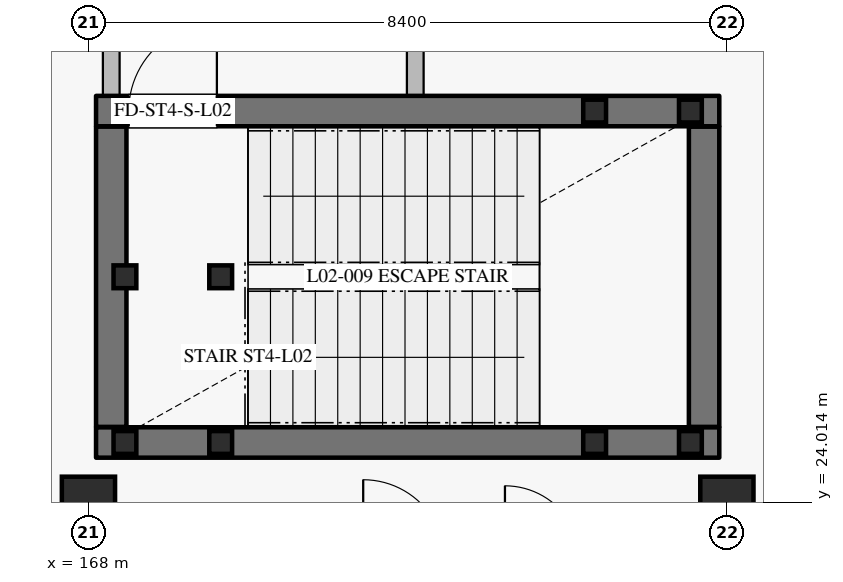
"""IFC4 building model, lengths in metres.
Left out: names, types, materials, properties, quantities, classifications, styles, units other than length and angle.
Written with IfcOpenShell. Run it as: python <this file> out.ifc"""

import sys

from ifc_helpers import new_model, si_unit, direction, frame, frame_2d, origin, origin_2d, place, context, subcontext, project, spatial, rectangle, hollow_rectangle, extrude, element, fill, save


model = new_model("IFC4")
c1 = context("Model", 3, precision=1e-05, world=origin(), true_north=direction((0.0, 1.0)))
c2 = subcontext(c1, "Body", "Model", "MODEL_VIEW")
j1 = project(units=[si_unit("LENGTHUNIT", "METRE"), si_unit("PLANEANGLEUNIT", "RADIAN")], contexts=[c1])
p1 = place(None, origin())
s1 = spatial("IfcSite", under=j1, at=p1, CompositionType="ELEMENT")
p2 = place(p1, origin())
s2 = spatial("IfcBuilding", under=s1, at=p2, CompositionType="ELEMENT")
p3 = place(p2, frame((0.0, 0.0, 11.4)))
s3 = spatial("IfcBuildingStorey", under=s2, at=p3, CompositionType="ELEMENT", Elevation=11.4)
for number, where, z_axis, x_axis in (
    (1, (168.0, 24.0, 0.0), (0.0, 0.0, 1.0), (1.0, 0.0, 0.0)),
    (2, (176.4, 24.0, 0.0), (0.0, 0.0, 1.0), (1.0, 0.0, 0.0)),
):
    element("IfcColumn", number, at=place(p3, frame(where, z_axis=z_axis, x_axis=x_axis)), inside=s3, PredefinedType="COLUMN", context=c2, shape_type="SweptSolid", body=[
        extrude(rectangle(XDim=0.7, YDim=0.7, at=origin_2d()), origin(), (0.0, 0.0, 1.0), 4.8),
    ])
p4 = place(p3, frame((168.1, 24.8, 0.0), z_axis=(0.0, 0.0, 1.0), x_axis=(1.0, 0.0, 0.0)))
e3 = element("IfcWall", 3, at=p4, inside=s3, PredefinedType="SHEAR", context=c2, shape_type="SweptSolid", body=[
    extrude(rectangle(XDim=8.2, YDim=0.4, at=frame_2d((4.1, 0.0))), origin(), (0.0, 0.0, 1.0), 4.535),
])
p5 = place(p3, frame((176.1, 25.005, 0.0), z_axis=(0.0, 0.0, 1.0), x_axis=(0.0, 1.0, 0.0)))
e4 = element("IfcWall", 4, at=p5, inside=s3, PredefinedType="SHEAR", context=c2, shape_type="SweptSolid", body=[
    extrude(rectangle(XDim=3.95, YDim=0.4, at=frame_2d((1.975, 0.0))), origin(), (0.0, 0.0, 1.0), 4.535),
])
p6 = place(p3, frame((168.1, 29.16, 0.0), z_axis=(0.0, 0.0, 1.0), x_axis=(1.0, 0.0, 0.0)))
e5 = element("IfcWall", 5, at=p6, inside=s3, PredefinedType="SHEAR", context=c2, shape_type="SweptSolid", body=[
    extrude(rectangle(XDim=8.2, YDim=0.4, at=frame_2d((4.1, 0.0))), origin(), (0.0, 0.0, 1.0), 4.535),
])
p7 = place(p6, frame((0.43, 0.0, 0.0)))
e6 = element("IfcOpeningElement", 6, at=p7, cuts=e5, PredefinedType="OPENING", context=c2, shape_type="SweptSolid", body=[
    extrude(rectangle(XDim=1.16, YDim=2.2, at=frame_2d((0.58, 1.1))), frame((0.0, 0.21, 0.0), z_axis=(0.0, -1.0, 0.0), x_axis=(1.0, 0.0, 0.0)), (0.0, 0.0, 1.0), 0.42),
])
p8 = place(p3, frame((168.3, 25.005, 0.0), z_axis=(0.0, 0.0, 1.0), x_axis=(0.0, 1.0, 0.0)))
e7 = element("IfcWall", 7, at=p8, inside=s3, PredefinedType="SHEAR", context=c2, shape_type="SweptSolid", body=[
    extrude(rectangle(XDim=3.95, YDim=0.4, at=frame_2d((1.975, 0.0))), origin(), (0.0, 0.0, 1.0), 4.535),
])
for number, where, z_axis, x_axis in (
    (8, (168.3, 29.365, 0.0), (0.0, 0.0, 1.0), (0.0, 1.0, 0.0)),
    (9, (172.3, 29.365, 0.0), (0.0, 0.0, 1.0), (0.0, 1.0, 0.0)),
):
    element("IfcWall", number, at=place(p3, frame(where, z_axis=z_axis, x_axis=x_axis)), inside=s3, PredefinedType="PARTITIONING", context=c2, shape_type="SweptSolid", body=[
        extrude(rectangle(XDim=2.92, YDim=0.22, at=frame_2d((1.46, 0.0))), origin(), (0.0, 0.0, 1.0), 4.535),
    ])
for number, where, z_axis, x_axis in (
    (10, (168.48, 24.8, 0.0), (0.0, 0.0, 1.0), (1.0, 0.0, 0.0)),
    (11, (168.48, 26.98, 0.0), (0.0, 0.0, 1.0), (1.0, 0.0, 0.0)),
    (12, (169.74, 24.8, 0.0), (0.0, 0.0, 1.0), (1.0, 0.0, 0.0)),
    (13, (169.74, 26.98, 0.0), (0.0, 0.0, 1.0), (1.0, 0.0, 0.0)),
):
    element("IfcColumn", number, at=place(p3, frame(where, z_axis=z_axis, x_axis=x_axis)), inside=s3, PredefinedType="COLUMN", context=c2, shape_type="SweptSolid", body=[
        extrude(hollow_rectangle(XDim=0.3, YDim=0.3, WallThickness=0.012, at=origin_2d()), origin(), (0.0, 0.0, 1.0), 4.62),
    ])
for number, where, z_axis, x_axis in (
    (14, (174.66, 24.8, -2.7), (0.0, 0.0, 1.0), (1.0, 0.0, 0.0)),
    (15, (174.66, 29.16, -2.7), (0.0, 0.0, 1.0), (1.0, 0.0, 0.0)),
    (16, (175.92, 24.8, -2.7), (0.0, 0.0, 1.0), (1.0, 0.0, 0.0)),
    (17, (175.92, 29.16, -2.7), (0.0, 0.0, 1.0), (1.0, 0.0, 0.0)),
):
    element("IfcColumn", number, at=place(p3, frame(where, z_axis=z_axis, x_axis=x_axis)), inside=s3, PredefinedType="COLUMN", context=c2, shape_type="SweptSolid", body=[
        extrude(hollow_rectangle(XDim=0.3, YDim=0.3, WallThickness=0.012, at=origin_2d()), origin(), (0.0, 0.0, 1.0), 4.92),
    ])
p9 = place(p7, origin())
e18 = element("IfcDoor", 18, at=p9, inside=s3, OperationType="SINGLE_SWING_RIGHT", PredefinedType="DOOR", context=c2, shape_type="SweptSolid", body=[
    extrude(rectangle(XDim=1.16, YDim=2.2, at=frame_2d((0.58, 1.1))), frame((0.0, 0.025, 0.0), z_axis=(0.0, -1.0, 0.0), x_axis=(1.0, 0.0, 0.0)), (0.0, 0.0, 1.0), 0.05),
])
fill(e6, e18)
save(model, sys.argv[1])
